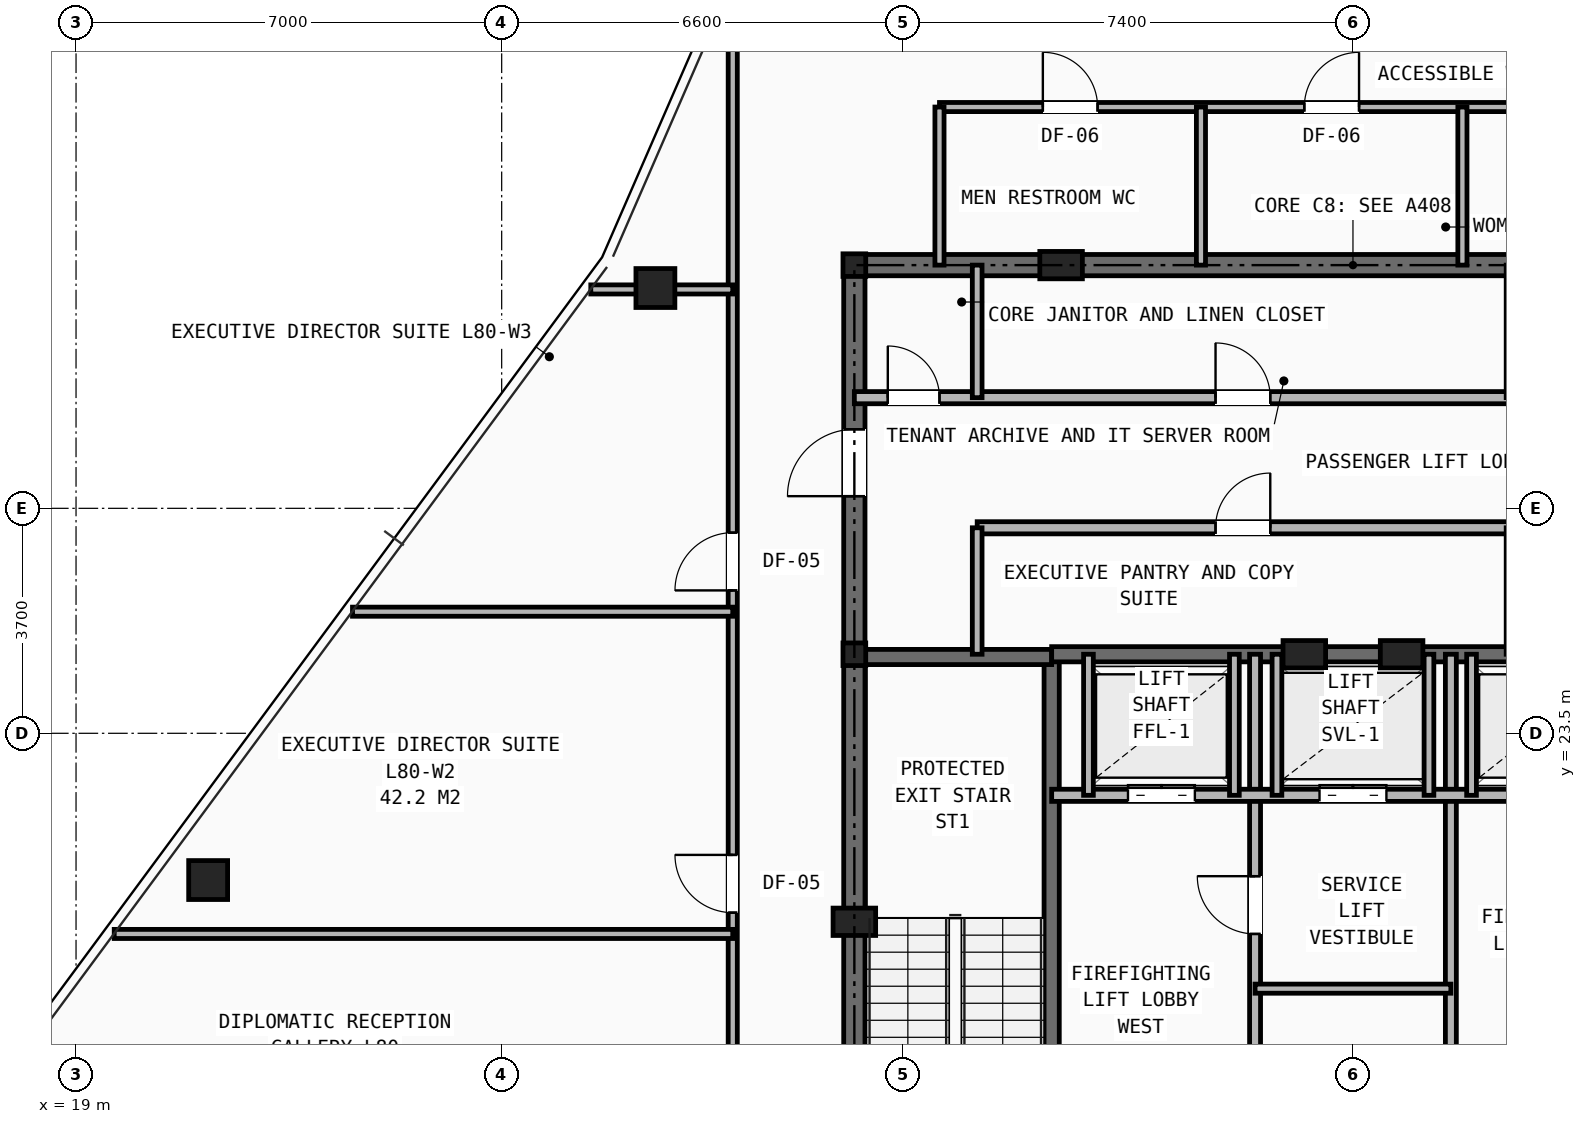
"""IFC4 building model, lengths in metres.
Left out: names, types, materials, properties, quantities, classifications, styles, units other than length and angle.
Written with IfcOpenShell. Run it as: python <this file> out.ifc"""

import sys

from ifc_helpers import new_model, si_unit, direction, frame, frame_2d, origin, origin_2d, place, context, subcontext, project, spatial, rectangle, hollow_rectangle, i_section, extrude, element, fill, save


model = new_model("IFC4")
c1 = context("Model", 3, precision=1e-05, world=origin(), true_north=direction((0.0, 1.0)))
c2 = subcontext(c1, "Body", "Model", "MODEL_VIEW")
j1 = project(units=[si_unit("LENGTHUNIT", "METRE"), si_unit("PLANEANGLEUNIT", "RADIAN")], contexts=[c1])
p1 = place(None, origin())
s1 = spatial("IfcSite", under=j1, at=p1, CompositionType="ELEMENT")
p2 = place(p1, origin())
s2 = spatial("IfcBuilding", under=s1, at=p2, CompositionType="ELEMENT")
p3 = place(p2, frame((0.0, 0.0, 283.0)))
s3 = spatial("IfcBuildingStorey", under=s2, at=p3, CompositionType="ELEMENT", Elevation=283.0)
for number, where, z_axis, x_axis in (
    (1, (31.8, 24.8, 0.0), (0.0, 0.0, 1.0), (1.0, 0.0, 0.0)),
    (2, (31.8, 31.2, 0.0), (0.0, 0.0, 1.0), (1.0, 0.0, 0.0)),
):
    element("IfcColumn", number, at=place(p3, frame(where, z_axis=z_axis, x_axis=x_axis)), inside=s3, PredefinedType="COLUMN", context=c2, shape_type="SweptSolid", body=[
        extrude(i_section(OverallWidth=0.374, OverallDepth=0.372, WebThickness=0.016, FlangeThickness=0.026, at=origin_2d()), origin(), (0.0, 0.0, 1.0), 3.5),
    ])
for number, where, z_axis, x_axis in (
    (3, (31.8, 20.4, 0.0), (0.0, 0.0, 1.0), (1.0, 0.0, 0.0)),
    (4, (35.2, 31.2, 0.0), (0.0, 0.0, 1.0), (1.0, 0.0, 0.0)),
    (5, (39.2, 24.8, 0.0), (0.0, 0.0, 1.0), (1.0, 0.0, 0.0)),
    (6, (40.8, 24.8, 0.0), (0.0, 0.0, 1.0), (1.0, 0.0, 0.0)),
):
    element("IfcColumn", number, at=place(p3, frame(where, z_axis=z_axis, x_axis=x_axis)), inside=s3, PredefinedType="PILASTER", context=c2, shape_type="SweptSolid", body=[
        extrude(rectangle(XDim=0.7, YDim=0.45, at=origin_2d()), origin(), (0.0, 0.0, 1.0), 3.5),
    ])
for number, where, z_axis, x_axis in (
    (7, (28.528, 30.823, 0.0), (0.0, 0.0, 1.0), (1.0, 0.0, 0.0)),
    (8, (21.173, 21.086, 0.0), (0.0, 0.0, 1.0), (1.0, 0.0, 0.0)),
):
    element("IfcColumn", number, at=place(p3, frame(where, z_axis=z_axis, x_axis=x_axis)), inside=s3, PredefinedType="COLUMN", context=c2, shape_type="SweptSolid", body=[
        extrude(hollow_rectangle(XDim=0.64, YDim=0.64, WallThickness=0.045, at=origin_2d()), origin(), (0.0, 0.0, 1.0), 3.5),
    ])
p4 = place(p3, frame((31.8, 31.2, 0.0), z_axis=(0.0, 0.0, 1.0), x_axis=(1.0, 0.0, 0.0)))
e9 = element("IfcWall", 9, at=p4, inside=s3, PredefinedType="SHEAR", context=c2, shape_type="SweptSolid", body=[
    extrude(rectangle(XDim=16.4, YDim=0.35, at=frame_2d((8.2, 0.0))), origin(), (0.0, 0.0, 1.0), 3.25),
])
p5 = place(p3, frame((31.8, 16.4, 0.0), z_axis=(0.0, 0.0, 1.0), x_axis=(0.0, 1.0, 0.0)))
e10 = element("IfcWall", 10, at=p5, inside=s3, PredefinedType="SHEAR", context=c2, shape_type="SweptSolid", body=[
    extrude(rectangle(XDim=14.8, YDim=0.35, at=frame_2d((7.4, 0.0))), origin(), (0.0, 0.0, 1.0), 3.25),
])
p6 = place(p5, frame((11.0, 0.0, 0.0)))
e11 = element("IfcOpeningElement", 11, at=p6, cuts=e10, PredefinedType="OPENING", context=c2, shape_type="SweptSolid", body=[
    extrude(rectangle(XDim=1.1, YDim=2.15, at=frame_2d((0.55, 1.075))), frame((0.0, 0.185, 0.0), z_axis=(0.0, -1.0, 0.0), x_axis=(1.0, 0.0, 0.0)), (0.0, 0.0, 1.0), 0.37),
])
p7 = place(p3, frame((35.045, 16.4, 0.0), z_axis=(0.0, 0.0, 1.0), x_axis=(0.0, 1.0, 0.0)))
e12 = element("IfcWall", 12, at=p7, inside=s3, PredefinedType="SHEAR", context=c2, shape_type="SweptSolid", body=[
    extrude(rectangle(XDim=8.4, YDim=0.25, at=frame_2d((4.2, 0.0))), origin(), (0.0, 0.0, 1.0), 3.25),
])
p8 = place(p7, frame((0.45, 0.0, 0.0)))
e13 = element("IfcOpeningElement", 13, at=p8, cuts=e12, PredefinedType="OPENING", context=c2, shape_type="SweptSolid", body=[
    extrude(rectangle(XDim=0.95, YDim=2.1, at=frame_2d((0.475, 1.05))), frame((0.0, 0.135, 0.0), z_axis=(0.0, -1.0, 0.0), x_axis=(1.0, 0.0, 0.0)), (0.0, 0.0, 1.0), 0.27),
])
p9 = place(p3, frame((31.8, 24.755, 0.0), z_axis=(0.0, 0.0, 1.0), x_axis=(1.0, 0.0, 0.0)))
e14 = element("IfcWall", 14, at=p9, inside=s3, PredefinedType="SHEAR", context=c2, shape_type="SweptSolid", body=[
    extrude(rectangle(XDim=3.245, YDim=0.25, at=frame_2d((1.623, 0.0))), origin(), (0.0, 0.0, 1.0), 3.25),
])
p10 = place(p3, frame((35.045, 24.8, 0.0), z_axis=(0.0, 0.0, 1.0), x_axis=(1.0, 0.0, 0.0)))
e15 = element("IfcWall", 15, at=p10, inside=s3, PredefinedType="SHEAR", context=c2, shape_type="SweptSolid", body=[
    extrude(rectangle(XDim=9.91, YDim=0.25, at=frame_2d((4.955, 0.0))), origin(), (0.0, 0.0, 1.0), 3.25),
])
p11 = place(p3, frame((38.39, 16.4, 0.0), z_axis=(0.0, 0.0, 1.0), x_axis=(0.0, 1.0, 0.0)))
e16 = element("IfcWall", 16, at=p11, inside=s3, PredefinedType="PARTITIONING", context=c2, shape_type="SweptSolid", body=[
    extrude(rectangle(XDim=8.4, YDim=0.18, at=frame_2d((4.2, 0.0))), origin(), (0.0, 0.0, 1.0), 2.978),
])
p12 = place(p11, frame((3.8, 0.0, 0.0)))
e17 = element("IfcOpeningElement", 17, at=p12, cuts=e16, PredefinedType="OPENING", context=c2, shape_type="SweptSolid", body=[
    extrude(rectangle(XDim=0.95, YDim=2.1, at=frame_2d((0.475, 1.05))), frame((0.0, 0.1, 0.0), z_axis=(0.0, -1.0, 0.0), x_axis=(1.0, 0.0, 0.0)), (0.0, 0.0, 1.0), 0.2),
])
p13 = place(p3, frame((41.61, 16.4, 0.0), z_axis=(0.0, 0.0, 1.0), x_axis=(0.0, 1.0, 0.0)))
e18 = element("IfcWall", 18, at=p13, inside=s3, PredefinedType="PARTITIONING", context=c2, shape_type="SweptSolid", body=[
    extrude(rectangle(XDim=8.4, YDim=0.18, at=frame_2d((4.2, 0.0))), origin(), (0.0, 0.0, 1.0), 2.978),
])
p14 = place(p3, frame((35.045, 22.48, 0.0), z_axis=(0.0, 0.0, 1.0), x_axis=(1.0, 0.0, 0.0)))
e19 = element("IfcWall", 19, at=p14, inside=s3, PredefinedType="SOLIDWALL", context=c2, shape_type="SweptSolid", body=[
    extrude(rectangle(XDim=9.91, YDim=0.2, at=frame_2d((4.955, 0.0))), origin(), (0.0, 0.0, 1.0), 3.25),
])
p15 = place(p14, frame((1.255, 0.0, 0.0)))
e20 = element("IfcOpeningElement", 20, at=p15, cuts=e19, PredefinedType="OPENING", context=c2, shape_type="SweptSolid", body=[
    extrude(rectangle(XDim=1.1, YDim=2.15, at=frame_2d((0.55, 1.075))), frame((0.0, 0.11, 0.0), z_axis=(0.0, -1.0, 0.0), x_axis=(1.0, 0.0, 0.0)), (0.0, 0.0, 1.0), 0.22),
])
p16 = place(p14, frame((7.555, 0.0, 0.0)))
e21 = element("IfcOpeningElement", 21, at=p16, cuts=e19, PredefinedType="OPENING", context=c2, shape_type="SweptSolid", body=[
    extrude(rectangle(XDim=1.1, YDim=2.15, at=frame_2d((0.55, 1.075))), frame((0.0, 0.11, 0.0), z_axis=(0.0, -1.0, 0.0), x_axis=(1.0, 0.0, 0.0)), (0.0, 0.0, 1.0), 0.22),
])
p17 = place(p14, frame((4.405, 0.0, 0.0)))
e22 = element("IfcOpeningElement", 22, at=p17, cuts=e19, PredefinedType="OPENING", context=c2, shape_type="SweptSolid", body=[
    extrude(rectangle(XDim=1.1, YDim=2.15, at=frame_2d((0.55, 1.075))), frame((0.0, 0.11, 0.0), z_axis=(0.0, -1.0, 0.0), x_axis=(1.0, 0.0, 0.0)), (0.0, 0.0, 1.0), 0.22),
])
p18 = place(p3, frame((38.39, 19.3, 0.0), z_axis=(0.0, 0.0, 1.0), x_axis=(1.0, 0.0, 0.0)))
e23 = element("IfcWall", 23, at=p18, inside=s3, PredefinedType="PARTITIONING", context=c2, shape_type="SweptSolid", body=[
    extrude(rectangle(XDim=3.22, YDim=0.15, at=frame_2d((1.61, 0.0))), origin(), (0.0, 0.0, 1.0), 3.25),
])
for number, where, z_axis, x_axis in (
    (24, (35.65, 22.48, 0.0), (0.0, 0.0, 1.0), (0.0, 1.0, 0.0)),
    (25, (38.05, 22.48, 0.0), (0.0, 0.0, 1.0), (0.0, 1.0, 0.0)),
    (26, (41.95, 22.48, 0.0), (0.0, 0.0, 1.0), (0.0, 1.0, 0.0)),
    (27, (38.75, 22.48, 0.0), (0.0, 0.0, 1.0), (0.0, 1.0, 0.0)),
    (28, (41.25, 22.48, 0.0), (0.0, 0.0, 1.0), (0.0, 1.0, 0.0)),
):
    element("IfcWall", number, at=place(p3, frame(where, z_axis=z_axis, x_axis=x_axis)), inside=s3, PredefinedType="SOLIDWALL", context=c2, shape_type="SweptSolid", body=[
        extrude(rectangle(XDim=2.32, YDim=0.16, at=frame_2d((1.16, 0.0))), origin(), (0.0, 0.0, 1.0), 3.25),
    ])
p19 = place(p3, frame((31.8, 29.02, 0.0), z_axis=(0.0, 0.0, 1.0), x_axis=(1.0, 0.0, 0.0)))
e29 = element("IfcWall", 29, at=p19, inside=s3, PredefinedType="SOLIDWALL", context=c2, shape_type="SweptSolid", body=[
    extrude(rectangle(XDim=16.4, YDim=0.2, at=frame_2d((8.2, 0.0))), origin(), (0.0, 0.0, 1.0), 2.705),
])
p20 = place(p19, frame((0.55, 0.0, 0.0)))
e30 = element("IfcOpeningElement", 30, at=p20, cuts=e29, PredefinedType="OPENING", context=c2, shape_type="SweptSolid", body=[
    extrude(rectangle(XDim=0.85, YDim=2.05, at=frame_2d((0.425, 1.025))), frame((0.0, 0.11, 0.0), z_axis=(0.0, -1.0, 0.0), x_axis=(1.0, 0.0, 0.0)), (0.0, 0.0, 1.0), 0.22),
])
p21 = place(p19, frame((5.94, 0.0, 0.0)))
e31 = element("IfcOpeningElement", 31, at=p21, cuts=e29, PredefinedType="OPENING", context=c2, shape_type="SweptSolid", body=[
    extrude(rectangle(XDim=0.9, YDim=2.1, at=frame_2d((0.45, 1.05))), frame((0.0, 0.11, 0.0), z_axis=(0.0, -1.0, 0.0), x_axis=(1.0, 0.0, 0.0)), (0.0, 0.0, 1.0), 0.22),
])
p22 = place(p19, frame((11.41, 0.0, 0.0)))
e32 = element("IfcOpeningElement", 32, at=p22, cuts=e29, PredefinedType="OPENING", context=c2, shape_type="SweptSolid", body=[
    extrude(rectangle(XDim=1.1, YDim=2.15, at=frame_2d((0.55, 1.075))), frame((0.0, 0.11, 0.0), z_axis=(0.0, -1.0, 0.0), x_axis=(1.0, 0.0, 0.0)), (0.0, 0.0, 1.0), 0.22),
])
p23 = place(p19, frame((13.73, 0.0, 0.0)))
e33 = element("IfcOpeningElement", 33, at=p23, cuts=e29, PredefinedType="OPENING", context=c2, shape_type="SweptSolid", body=[
    extrude(rectangle(XDim=1.1, YDim=2.15, at=frame_2d((0.55, 1.075))), frame((0.0, 0.11, 0.0), z_axis=(0.0, -1.0, 0.0), x_axis=(1.0, 0.0, 0.0)), (0.0, 0.0, 1.0), 0.22),
])
p24 = place(p3, frame((33.82, 26.88, 0.0), z_axis=(0.0, 0.0, 1.0), x_axis=(1.0, 0.0, 0.0)))
e34 = element("IfcWall", 34, at=p24, inside=s3, PredefinedType="SOLIDWALL", context=c2, shape_type="SweptSolid", body=[
    extrude(rectangle(XDim=14.38, YDim=0.2, at=frame_2d((7.19, 0.0))), origin(), (0.0, 0.0, 1.0), 2.705),
])
p25 = place(p24, frame((3.92, 0.0, 0.0)))
e35 = element("IfcOpeningElement", 35, at=p25, cuts=e34, PredefinedType="OPENING", context=c2, shape_type="SweptSolid", body=[
    extrude(rectangle(XDim=0.9, YDim=2.1, at=frame_2d((0.45, 1.05))), frame((0.0, 0.11, 0.0), z_axis=(0.0, -1.0, 0.0), x_axis=(1.0, 0.0, 0.0)), (0.0, 0.0, 1.0), 0.22),
])
p26 = place(p24, frame((9.39, 0.0, 0.0)))
e36 = element("IfcOpeningElement", 36, at=p26, cuts=e34, PredefinedType="OPENING", context=c2, shape_type="SweptSolid", body=[
    extrude(rectangle(XDim=1.1, YDim=2.15, at=frame_2d((0.55, 1.075))), frame((0.0, 0.11, 0.0), z_axis=(0.0, -1.0, 0.0), x_axis=(1.0, 0.0, 0.0)), (0.0, 0.0, 1.0), 0.22),
])
p27 = place(p24, frame((11.71, 0.0, 0.0)))
e37 = element("IfcOpeningElement", 37, at=p27, cuts=e34, PredefinedType="OPENING", context=c2, shape_type="SweptSolid", body=[
    extrude(rectangle(XDim=1.1, YDim=2.15, at=frame_2d((0.55, 1.075))), frame((0.0, 0.11, 0.0), z_axis=(0.0, -1.0, 0.0), x_axis=(1.0, 0.0, 0.0)), (0.0, 0.0, 1.0), 0.22),
])
p28 = place(p3, frame((33.82, 29.02, 0.0), z_axis=(0.0, 0.0, 1.0), x_axis=(0.0, 1.0, 0.0)))
e38 = element("IfcWall", 38, at=p28, inside=s3, PredefinedType="SOLIDWALL", context=c2, shape_type="SweptSolid", body=[
    extrude(rectangle(XDim=2.18, YDim=0.16, at=frame_2d((1.09, 0.0))), origin(), (0.0, 0.0, 1.0), 2.978),
])
p29 = place(p3, frame((33.82, 24.8, 0.0), z_axis=(0.0, 0.0, 1.0), x_axis=(0.0, 1.0, 0.0)))
e39 = element("IfcWall", 39, at=p29, inside=s3, PredefinedType="SOLIDWALL", context=c2, shape_type="SweptSolid", body=[
    extrude(rectangle(XDim=2.08, YDim=0.16, at=frame_2d((1.04, 0.0))), origin(), (0.0, 0.0, 1.0), 3.25),
])
p30 = place(p3, frame((33.2, 33.8, 0.0), z_axis=(0.0, 0.0, 1.0), x_axis=(1.0, 0.0, 0.0)))
e40 = element("IfcWall", 40, at=p30, inside=s3, PredefinedType="PARTITIONING", context=c2, shape_type="SweptSolid", body=[
    extrude(rectangle(XDim=13.0, YDim=0.15, at=frame_2d((6.5, 0.0))), origin(), (0.0, 0.0, 1.0), 3.25),
])
p31 = place(p30, frame((1.7, 0.0, 0.0)))
e41 = element("IfcOpeningElement", 41, at=p31, cuts=e40, PredefinedType="OPENING", context=c2, shape_type="SweptSolid", body=[
    extrude(rectangle(XDim=0.9, YDim=2.1, at=frame_2d((0.45, 1.05))), frame((0.0, 0.085, 0.0), z_axis=(0.0, -1.0, 0.0), x_axis=(1.0, 0.0, 0.0)), (0.0, 0.0, 1.0), 0.17),
])
p32 = place(p30, frame((6.0, 0.0, 0.0)))
e42 = element("IfcOpeningElement", 42, at=p32, cuts=e40, PredefinedType="OPENING", context=c2, shape_type="SweptSolid", body=[
    extrude(rectangle(XDim=0.9, YDim=2.1, at=frame_2d((0.45, 1.05))), frame((0.0, 0.085, 0.0), z_axis=(0.0, -1.0, 0.0), x_axis=(1.0, 0.0, 0.0)), (0.0, 0.0, 1.0), 0.17),
])
p33 = place(p30, frame((10.35, 0.0, 0.0)))
e43 = element("IfcOpeningElement", 43, at=p33, cuts=e40, PredefinedType="OPENING", context=c2, shape_type="SweptSolid", body=[
    extrude(rectangle(XDim=0.9, YDim=2.1, at=frame_2d((0.45, 1.05))), frame((0.0, 0.085, 0.0), z_axis=(0.0, -1.0, 0.0), x_axis=(1.0, 0.0, 0.0)), (0.0, 0.0, 1.0), 0.17),
])
for number, where, z_axis, x_axis in (
    (44, (33.2, 31.2, 0.0), (0.0, 0.0, 1.0), (0.0, 1.0, 0.0)),
    (45, (37.5, 31.2, 0.0), (0.0, 0.0, 1.0), (0.0, 1.0, 0.0)),
    (46, (41.8, 31.2, 0.0), (0.0, 0.0, 1.0), (0.0, 1.0, 0.0)),
):
    element("IfcWall", number, at=place(p3, frame(where, z_axis=z_axis, x_axis=x_axis)), inside=s3, PredefinedType="PARTITIONING", context=c2, shape_type="SweptSolid", body=[
        extrude(rectangle(XDim=2.6, YDim=0.15, at=frame_2d((1.3, 0.0))), origin(), (0.0, 0.0, 1.0), 2.978),
    ])
p34 = place(p3, frame((29.8, 16.4, 0.0), z_axis=(0.0, 0.0, 1.0), x_axis=(0.0, 1.0, 0.0)))
e47 = element("IfcWall", 47, at=p34, inside=s3, PredefinedType="PARTITIONING", context=c2, shape_type="SweptSolid", body=[
    extrude(rectangle(XDim=19.3, YDim=0.15, at=frame_2d((9.65, 0.0))), origin(), (0.0, 0.0, 1.0), 2.265),
])
p35 = place(p34, frame((0.35, 0.0, 0.0)))
e48 = element("IfcOpeningElement", 48, at=p35, cuts=e47, PredefinedType="OPENING", context=c2, shape_type="SweptSolid", body=[
    extrude(rectangle(XDim=0.95, YDim=2.1, at=frame_2d((0.475, 1.05))), frame((0.0, 0.085, 0.0), z_axis=(0.0, -1.0, 0.0), x_axis=(1.0, 0.0, 0.0)), (0.0, 0.0, 1.0), 0.17),
])
p36 = place(p34, frame((4.15, 0.0, 0.0)))
e49 = element("IfcOpeningElement", 49, at=p36, cuts=e47, PredefinedType="OPENING", context=c2, shape_type="SweptSolid", body=[
    extrude(rectangle(XDim=0.95, YDim=2.1, at=frame_2d((0.475, 1.05))), frame((0.0, 0.085, 0.0), z_axis=(0.0, -1.0, 0.0), x_axis=(1.0, 0.0, 0.0)), (0.0, 0.0, 1.0), 0.17),
])
p37 = place(p34, frame((9.45, 0.0, 0.0)))
e50 = element("IfcOpeningElement", 50, at=p37, cuts=e47, PredefinedType="OPENING", context=c2, shape_type="SweptSolid", body=[
    extrude(rectangle(XDim=0.95, YDim=2.1, at=frame_2d((0.475, 1.05))), frame((0.0, 0.085, 0.0), z_axis=(0.0, -1.0, 0.0), x_axis=(1.0, 0.0, 0.0)), (0.0, 0.0, 1.0), 0.17),
])
p38 = place(p3, frame((19.628, 20.2, 0.0), z_axis=(0.0, 0.0, 1.0), x_axis=(1.0, 0.0, 0.0)))
e51 = element("IfcWall", 51, at=p38, inside=s3, PredefinedType="PARTITIONING", context=c2, shape_type="SweptSolid", body=[
    extrude(rectangle(XDim=10.172, YDim=0.15, at=frame_2d((5.086, 0.0))), origin(), (0.0, 0.0, 1.0), 2.265),
])
p39 = place(p3, frame((23.547, 25.5, 0.0), z_axis=(0.0, 0.0, 1.0), x_axis=(1.0, 0.0, 0.0)))
e52 = element("IfcWall", 52, at=p39, inside=s3, PredefinedType="PARTITIONING", context=c2, shape_type="SweptSolid", body=[
    extrude(rectangle(XDim=6.253, YDim=0.15, at=frame_2d((3.127, 0.0))), origin(), (0.0, 0.0, 1.0), 2.628),
])
p40 = place(p3, frame((27.466, 30.8, 0.0), z_axis=(0.0, 0.0, 1.0), x_axis=(1.0, 0.0, 0.0)))
e53 = element("IfcWall", 53, at=p40, inside=s3, PredefinedType="PARTITIONING", context=c2, shape_type="SweptSolid", body=[
    extrude(rectangle(XDim=2.334, YDim=0.15, at=frame_2d((1.167, 0.0))), origin(), (0.0, 0.0, 1.0), 2.265),
])
p41 = place(p12, origin())
e54 = element("IfcDoor", 54, at=p41, inside=s3, OperationType="SINGLE_SWING_RIGHT", PredefinedType="DOOR", context=c2, shape_type="SweptSolid", body=[
    extrude(rectangle(XDim=0.95, YDim=2.1, at=frame_2d((0.475, 1.05))), frame((0.0, 0.025, 0.0), z_axis=(0.0, -1.0, 0.0), x_axis=(1.0, 0.0, 0.0)), (0.0, 0.0, 1.0), 0.05),
])
fill(e17, e54)
p42 = place(p15, origin())
e55 = element("IfcDoor", 55, at=p42, inside=s3, OperationType="DOUBLE_DOOR_SLIDING", PredefinedType="DOOR", context=c2, shape_type="SweptSolid", body=[
    extrude(rectangle(XDim=1.1, YDim=2.15, at=frame_2d((0.55, 1.075))), frame((0.0, 0.025, 0.0), z_axis=(0.0, -1.0, 0.0), x_axis=(1.0, 0.0, 0.0)), (0.0, 0.0, 1.0), 0.05),
])
fill(e20, e55)
p43 = place(p17, origin())
e56 = element("IfcDoor", 56, at=p43, inside=s3, OperationType="DOUBLE_DOOR_SLIDING", PredefinedType="DOOR", context=c2, shape_type="SweptSolid", body=[
    extrude(rectangle(XDim=1.1, YDim=2.15, at=frame_2d((0.55, 1.075))), frame((0.0, 0.025, 0.0), z_axis=(0.0, -1.0, 0.0), x_axis=(1.0, 0.0, 0.0)), (0.0, 0.0, 1.0), 0.05),
])
fill(e22, e56)
p44 = place(p20, origin())
e57 = element("IfcDoor", 57, at=p44, inside=s3, OperationType="SINGLE_SWING_LEFT", PredefinedType="DOOR", context=c2, shape_type="SweptSolid", body=[
    extrude(rectangle(XDim=0.85, YDim=2.05, at=frame_2d((0.425, 1.025))), frame((0.0, 0.025, 0.0), z_axis=(0.0, -1.0, 0.0), x_axis=(1.0, 0.0, 0.0)), (0.0, 0.0, 1.0), 0.05),
])
fill(e30, e57)
p45 = place(p6, origin())
e58 = element("IfcDoor", 58, at=p45, inside=s3, OperationType="SINGLE_SWING_LEFT", PredefinedType="DOOR", context=c2, shape_type="SweptSolid", body=[
    extrude(rectangle(XDim=1.1, YDim=2.15, at=frame_2d((0.55, 1.075))), frame((0.0, 0.025, 0.0), z_axis=(0.0, -1.0, 0.0), x_axis=(1.0, 0.0, 0.0)), (0.0, 0.0, 1.0), 0.05),
])
fill(e11, e58)
p46 = place(p21, origin())
e59 = element("IfcDoor", 59, at=p46, inside=s3, OperationType="SINGLE_SWING_LEFT", PredefinedType="DOOR", context=c2, shape_type="SweptSolid", body=[
    extrude(rectangle(XDim=0.9, YDim=2.1, at=frame_2d((0.45, 1.05))), frame((0.0, 0.025, 0.0), z_axis=(0.0, -1.0, 0.0), x_axis=(1.0, 0.0, 0.0)), (0.0, 0.0, 1.0), 0.05),
])
fill(e31, e59)
p47 = place(p25, origin())
e60 = element("IfcDoor", 60, at=p47, inside=s3, OperationType="SINGLE_SWING_RIGHT", PredefinedType="DOOR", context=c2, shape_type="SweptSolid", body=[
    extrude(rectangle(XDim=0.9, YDim=2.1, at=frame_2d((0.45, 1.05))), frame((0.0, 0.025, 0.0), z_axis=(0.0, -1.0, 0.0), x_axis=(1.0, 0.0, 0.0)), (0.0, 0.0, 1.0), 0.05),
])
fill(e35, e60)
p48 = place(p31, origin())
e61 = element("IfcDoor", 61, at=p48, inside=s3, OperationType="SINGLE_SWING_LEFT", PredefinedType="DOOR", context=c2, shape_type="SweptSolid", body=[
    extrude(rectangle(XDim=0.9, YDim=2.1, at=frame_2d((0.45, 1.05))), frame((0.0, 0.025, 0.0), z_axis=(0.0, -1.0, 0.0), x_axis=(1.0, 0.0, 0.0)), (0.0, 0.0, 1.0), 0.05),
])
fill(e41, e61)
p49 = place(p32, origin())
e62 = element("IfcDoor", 62, at=p49, inside=s3, OperationType="SINGLE_SWING_RIGHT", PredefinedType="DOOR", context=c2, shape_type="SweptSolid", body=[
    extrude(rectangle(XDim=0.9, YDim=2.1, at=frame_2d((0.45, 1.05))), frame((0.0, 0.025, 0.0), z_axis=(0.0, -1.0, 0.0), x_axis=(1.0, 0.0, 0.0)), (0.0, 0.0, 1.0), 0.05),
])
fill(e42, e62)
p50 = place(p36, origin())
e63 = element("IfcDoor", 63, at=p50, inside=s3, OperationType="SINGLE_SWING_RIGHT", PredefinedType="DOOR", context=c2, shape_type="SweptSolid", body=[
    extrude(rectangle(XDim=0.95, YDim=2.1, at=frame_2d((0.475, 1.05))), frame((0.0, 0.025, 0.0), z_axis=(0.0, -1.0, 0.0), x_axis=(1.0, 0.0, 0.0)), (0.0, 0.0, 1.0), 0.05),
])
fill(e49, e63)
p51 = place(p37, origin())
e64 = element("IfcDoor", 64, at=p51, inside=s3, OperationType="SINGLE_SWING_LEFT", PredefinedType="DOOR", context=c2, shape_type="SweptSolid", body=[
    extrude(rectangle(XDim=0.95, YDim=2.1, at=frame_2d((0.475, 1.05))), frame((0.0, 0.025, 0.0), z_axis=(0.0, -1.0, 0.0), x_axis=(1.0, 0.0, 0.0)), (0.0, 0.0, 1.0), 0.05),
])
fill(e50, e64)
save(model, sys.argv[1])
